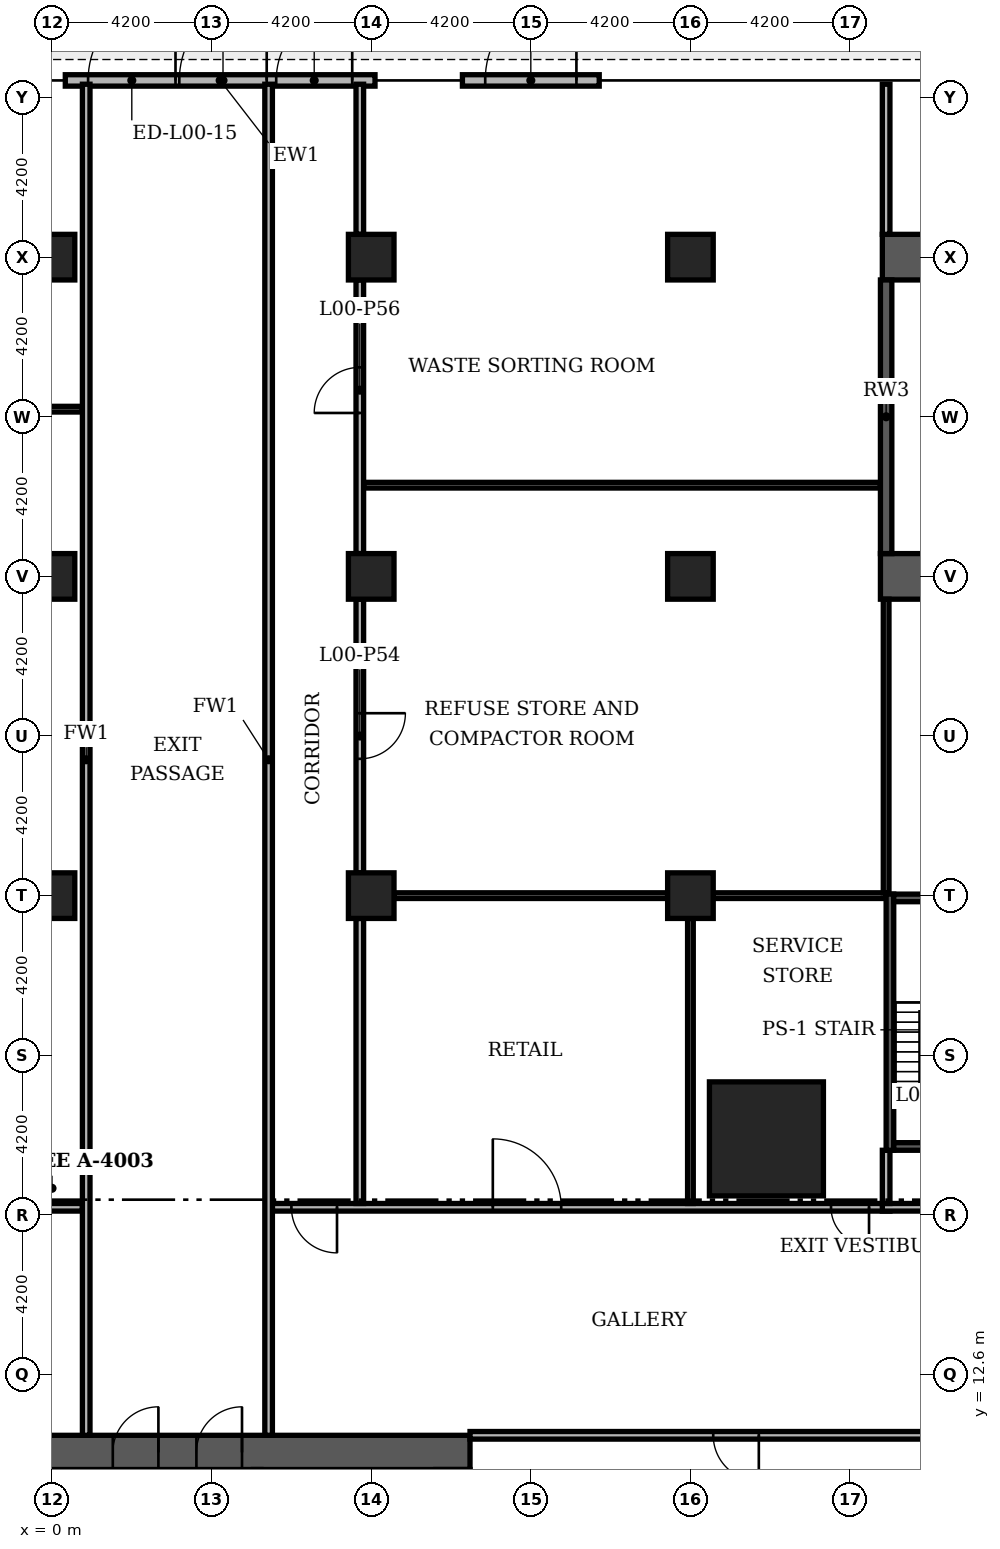
"""IFC4 building model, lengths in metres.
Left out: names, types, materials, properties, quantities, classifications, styles, units other than length and angle.
Written with IfcOpenShell. Run it as: python <this file> out.ifc"""

import sys

from ifc_helpers import new_model, si_unit, direction, frame, frame_2d, origin, origin_2d, place, context, subcontext, project, spatial, rectangle, extrude, element, fill, save


model = new_model("IFC4")
c1 = context("Model", 3, precision=1e-05, world=origin(), true_north=direction((0.0, 1.0)))
c2 = subcontext(c1, "Body", "Model", "MODEL_VIEW")
j1 = project(units=[si_unit("LENGTHUNIT", "METRE"), si_unit("PLANEANGLEUNIT", "RADIAN")], contexts=[c1])
p1 = place(None, origin())
s1 = spatial("IfcSite", under=j1, at=p1, CompositionType="ELEMENT")
p2 = place(p1, origin())
s2 = spatial("IfcBuilding", under=s1, at=p2, CompositionType="ELEMENT")
p3 = place(p2, origin())
s3 = spatial("IfcBuildingStorey", under=s2, at=p3, CompositionType="ELEMENT", Elevation=0.0)
p4 = place(p3, frame((-11.0, 10.55, 0.0), z_axis=(0.0, 0.0, 1.0), x_axis=(1.0, 0.0, 0.0)))
e1 = element("IfcWall", 1, at=p4, inside=s3, PredefinedType="SHEAR", context=c2, shape_type="SweptSolid", body=[
    extrude(rectangle(XDim=22.0, YDim=0.9, at=frame_2d((11.0, 0.0))), origin(), (0.0, 0.0, 1.0), 6.78),
])
p5 = place(p4, frame((12.6, 0.0, 0.0)))
e2 = element("IfcOpeningElement", 2, at=p5, cuts=e1, PredefinedType="OPENING", context=c2, shape_type="SweptSolid", body=[
    extrude(rectangle(XDim=1.2, YDim=2.2, at=frame_2d((0.6, 1.1))), frame((0.0, 0.46, 0.0), z_axis=(0.0, -1.0, 0.0), x_axis=(1.0, 0.0, 0.0)), (0.0, 0.0, 1.0), 0.92),
])
p6 = place(p4, frame((14.8, 0.0, 0.0)))
e3 = element("IfcOpeningElement", 3, at=p6, cuts=e1, PredefinedType="OPENING", context=c2, shape_type="SweptSolid", body=[
    extrude(rectangle(XDim=1.2, YDim=2.2, at=frame_2d((0.6, 1.1))), frame((0.0, 0.46, 0.0), z_axis=(0.0, -1.0, 0.0), x_axis=(1.0, 0.0, 0.0)), (0.0, 0.0, 1.0), 0.92),
])
p7 = place(p3, frame((18.8, 18.8, 0.0), z_axis=(0.0, 0.0, 1.0), x_axis=(1.0, 0.0, 0.0)))
e4 = element("IfcColumn", 4, at=p7, inside=s3, PredefinedType="COLUMN", context=c2, shape_type="SweptSolid", body=[
    extrude(rectangle(XDim=3.0, YDim=3.0, at=origin_2d()), origin(), (0.0, 0.0, 1.0), 7.2),
])
for number, where, z_axis, x_axis in (
    (5, (0.0, 25.2, 0.0), (0.0, 0.0, 1.0), (1.0, 0.0, 0.0)),
    (6, (8.4, 25.2, 0.0), (0.0, 0.0, 1.0), (1.0, 0.0, 0.0)),
    (7, (16.8, 25.2, 0.0), (0.0, 0.0, 1.0), (1.0, 0.0, 0.0)),
    (8, (0.0, 33.6, 0.0), (0.0, 0.0, 1.0), (1.0, 0.0, 0.0)),
    (9, (0.0, 42.0, 0.0), (0.0, 0.0, 1.0), (1.0, 0.0, 0.0)),
    (10, (8.4, 33.6, 0.0), (0.0, 0.0, 1.0), (1.0, 0.0, 0.0)),
    (11, (8.4, 42.0, 0.0), (0.0, 0.0, 1.0), (1.0, 0.0, 0.0)),
    (12, (16.8, 33.6, 0.0), (0.0, 0.0, 1.0), (1.0, 0.0, 0.0)),
    (13, (16.8, 42.0, 0.0), (0.0, 0.0, 1.0), (1.0, 0.0, 0.0)),
):
    element("IfcColumn", number, at=place(p3, frame(where, z_axis=z_axis, x_axis=x_axis)), inside=s3, PredefinedType="COLUMN", context=c2, shape_type="SweptSolid", body=[
        extrude(rectangle(XDim=1.2, YDim=1.2, at=origin_2d()), origin(), (0.0, 0.0, 1.0), 7.2),
    ])
p8 = place(p3, frame((14.4, 46.65, 0.0), z_axis=(0.0, 0.0, 1.0), x_axis=(-1.0, 0.0, 0.0)))
e14 = element("IfcWall", 14, at=p8, inside=s3, PredefinedType="STANDARD", context=c2, shape_type="SweptSolid", body=[
    extrude(rectangle(XDim=3.6, YDim=0.3, at=frame_2d((1.8, 0.0))), origin(), (0.0, 0.0, 1.0), 6.78),
])
p9 = place(p8, frame((0.6, 0.0, 0.0)))
e15 = element("IfcOpeningElement", 15, at=p9, cuts=e14, PredefinedType="OPENING", context=c2, shape_type="SweptSolid", body=[
    extrude(rectangle(XDim=2.4, YDim=2.4, at=frame_2d((1.2, 1.2))), frame((0.0, 0.16, 0.0), z_axis=(0.0, -1.0, 0.0), x_axis=(1.0, 0.0, 0.0)), (0.0, 0.0, 1.0), 0.32),
])
p10 = place(p3, frame((8.5, 46.65, 0.0), z_axis=(0.0, 0.0, 1.0), x_axis=(-1.0, 0.0, 0.0)))
e16 = element("IfcWall", 16, at=p10, inside=s3, PredefinedType="STANDARD", context=c2, shape_type="SweptSolid", body=[
    extrude(rectangle(XDim=8.15, YDim=0.3, at=frame_2d((4.075, 0.0))), origin(), (0.0, 0.0, 1.0), 6.78),
])
p11 = place(p10, frame((0.6, 0.0, 0.0)))
e17 = element("IfcOpeningElement", 17, at=p11, cuts=e16, PredefinedType="OPENING", context=c2, shape_type="SweptSolid", body=[
    extrude(rectangle(XDim=2.0, YDim=2.4, at=frame_2d((1.0, 1.2))), frame((0.0, 0.16, 0.0), z_axis=(0.0, -1.0, 0.0), x_axis=(1.0, 0.0, 0.0)), (0.0, 0.0, 1.0), 0.32),
])
p12 = place(p10, frame((2.85, 0.0, 0.0)))
e18 = element("IfcOpeningElement", 18, at=p12, cuts=e16, PredefinedType="OPENING", context=c2, shape_type="SweptSolid", body=[
    extrude(rectangle(XDim=2.3, YDim=2.4, at=frame_2d((1.15, 1.2))), frame((0.0, 0.16, 0.0), z_axis=(0.0, -1.0, 0.0), x_axis=(1.0, 0.0, 0.0)), (0.0, 0.0, 1.0), 0.32),
])
p13 = place(p10, frame((5.25, 0.0, 0.0)))
e19 = element("IfcOpeningElement", 19, at=p13, cuts=e16, PredefinedType="OPENING", context=c2, shape_type="SweptSolid", body=[
    extrude(rectangle(XDim=2.3, YDim=2.4, at=frame_2d((1.15, 1.2))), frame((0.0, 0.16, 0.0), z_axis=(0.0, -1.0, 0.0), x_axis=(1.0, 0.0, 0.0)), (0.0, 0.0, 1.0), 0.32),
])
p14 = place(p3, frame((11.0, 11.0, 0.0), z_axis=(0.0, 0.0, 1.0), x_axis=(1.0, 0.0, 0.0)))
e20 = element("IfcWall", 20, at=p14, inside=s3, PredefinedType="PARTITIONING", context=c2, shape_type="SweptSolid", body=[
    extrude(rectangle(XDim=14.1, YDim=0.2, at=frame_2d((7.05, 0.0))), origin(), (0.0, 0.0, 1.0), 6.78),
])
p15 = place(p14, frame((6.4, 0.0, 0.0)))
e21 = element("IfcOpeningElement", 21, at=p15, cuts=e20, PredefinedType="OPENING", context=c2, shape_type="SweptSolid", body=[
    extrude(rectangle(XDim=1.2, YDim=2.2, at=frame_2d((0.6, 1.1))), frame((0.0, 0.11, 0.0), z_axis=(0.0, -1.0, 0.0), x_axis=(1.0, 0.0, 0.0)), (0.0, 0.0, 1.0), 0.22),
])
p16 = place(p3, frame((-22.05, 17.0, 0.0), z_axis=(0.0, 0.0, 1.0), x_axis=(1.0, 0.0, 0.0)))
e22 = element("IfcWall", 22, at=p16, inside=s3, PredefinedType="PARTITIONING", context=c2, shape_type="SweptSolid", body=[
    extrude(rectangle(XDim=22.85, YDim=0.2, at=frame_2d((11.425, 0.0))), origin(), (0.0, 0.0, 1.0), 6.78),
])
p17 = place(p16, frame((0.55, 0.0, 0.0)))
e23 = element("IfcOpeningElement", 23, at=p17, cuts=e22, PredefinedType="OPENING", context=c2, shape_type="SweptSolid", body=[
    extrude(rectangle(XDim=1.0, YDim=2.1, at=frame_2d((0.5, 1.05))), frame((0.0, 0.11, 0.0), z_axis=(0.0, -1.0, 0.0), x_axis=(1.0, 0.0, 0.0)), (0.0, 0.0, 1.0), 0.22),
])
p18 = place(p16, frame((13.15, 0.0, 0.0)))
e24 = element("IfcOpeningElement", 24, at=p18, cuts=e22, PredefinedType="OPENING", context=c2, shape_type="SweptSolid", body=[
    extrude(rectangle(XDim=1.8, YDim=2.2, at=frame_2d((0.9, 1.1))), frame((0.0, 0.11, 0.0), z_axis=(0.0, -1.0, 0.0), x_axis=(1.0, 0.0, 0.0)), (0.0, 0.0, 1.0), 0.22),
])
p19 = place(p3, frame((5.8, 17.0, 0.0), z_axis=(0.0, 0.0, 1.0), x_axis=(1.0, 0.0, 0.0)))
e25 = element("IfcWall", 25, at=p19, inside=s3, PredefinedType="PARTITIONING", context=c2, shape_type="SweptSolid", body=[
    extrude(rectangle(XDim=16.25, YDim=0.2, at=frame_2d((8.125, 0.0))), origin(), (0.0, 0.0, 1.0), 6.78),
])
p20 = place(p19, frame((0.5, 0.0, 0.0)))
e26 = element("IfcOpeningElement", 26, at=p20, cuts=e25, PredefinedType="OPENING", context=c2, shape_type="SweptSolid", body=[
    extrude(rectangle(XDim=1.2, YDim=2.2, at=frame_2d((0.6, 1.1))), frame((0.0, 0.11, 0.0), z_axis=(0.0, -1.0, 0.0), x_axis=(1.0, 0.0, 0.0)), (0.0, 0.0, 1.0), 0.22),
])
p21 = place(p19, frame((5.8, 0.0, 0.0)))
e27 = element("IfcOpeningElement", 27, at=p21, cuts=e25, PredefinedType="OPENING", context=c2, shape_type="SweptSolid", body=[
    extrude(rectangle(XDim=1.8, YDim=2.2, at=frame_2d((0.9, 1.1))), frame((0.0, 0.11, 0.0), z_axis=(0.0, -1.0, 0.0), x_axis=(1.0, 0.0, 0.0)), (0.0, 0.0, 1.0), 0.22),
])
p22 = place(p19, frame((14.7, 0.0, 0.0)))
e28 = element("IfcOpeningElement", 28, at=p22, cuts=e25, PredefinedType="OPENING", context=c2, shape_type="SweptSolid", body=[
    extrude(rectangle(XDim=1.0, YDim=2.1, at=frame_2d((0.5, 1.05))), frame((0.0, 0.11, 0.0), z_axis=(0.0, -1.0, 0.0), x_axis=(1.0, 0.0, 0.0)), (0.0, 0.0, 1.0), 0.22),
])
p23 = place(p3, frame((21.85, 17.0, 0.0), z_axis=(0.0, 0.0, 1.0), x_axis=(1.0, 0.0, 0.0)))
e29 = element("IfcWall", 29, at=p23, inside=s3, PredefinedType="PARTITIONING", context=c2, shape_type="SweptSolid", body=[
    extrude(rectangle(XDim=2.75, YDim=0.2, at=frame_2d((1.375, 0.0))), origin(), (0.0, 0.0, 1.0), 6.78),
])
p24 = place(p3, frame((9.0, 25.2, 0.0), z_axis=(0.0, 0.0, 1.0), x_axis=(1.0, 0.0, 0.0)))
e30 = element("IfcWall", 30, at=p24, inside=s3, PredefinedType="PARTITIONING", context=c2, shape_type="SweptSolid", body=[
    extrude(rectangle(XDim=7.2, YDim=0.15, at=frame_2d((3.6, 0.0))), origin(), (0.0, 0.0, 1.0), 6.48),
])
p25 = place(p3, frame((17.4, 25.2, 0.0), z_axis=(0.0, 0.0, 1.0), x_axis=(1.0, 0.0, 0.0)))
e31 = element("IfcWall", 31, at=p25, inside=s3, PredefinedType="PARTITIONING", context=c2, shape_type="SweptSolid", body=[
    extrude(rectangle(XDim=4.55, YDim=0.15, at=frame_2d((2.275, 0.0))), origin(), (0.0, 0.0, 1.0), 6.48),
])
p26 = place(p3, frame((21.8, 33.6, 0.0), z_axis=(0.0, 0.0, 1.0), x_axis=(1.0, 0.0, 0.0)))
e32 = element("IfcWall", 32, at=p26, inside=s3, PredefinedType="SOLIDWALL", context=c2, shape_type="SweptSolid", body=[
    extrude(rectangle(XDim=2.8, YDim=1.2, at=frame_2d((1.4, 0.0))), origin(), (0.0, 0.0, 1.0), 6.78),
])
p27 = place(p3, frame((8.2, 36.0, 0.0), z_axis=(0.0, 0.0, 1.0), x_axis=(1.0, 0.0, 0.0)))
e33 = element("IfcWall", 33, at=p27, inside=s3, PredefinedType="PARTITIONING", context=c2, shape_type="SweptSolid", body=[
    extrude(rectangle(XDim=13.6, YDim=0.15, at=frame_2d((6.8, 0.0))), origin(), (0.0, 0.0, 1.0), 6.38),
])
p28 = place(p3, frame((-46.55, 38.0, 0.0), z_axis=(0.0, 0.0, 1.0), x_axis=(1.0, 0.0, 0.0)))
e34 = element("IfcWall", 34, at=p28, inside=s3, PredefinedType="PARTITIONING", context=c2, shape_type="SweptSolid", body=[
    extrude(rectangle(XDim=47.35, YDim=0.15, at=frame_2d((23.675, 0.0))), origin(), (0.0, 0.0, 1.0), 6.38),
])
p29 = place(p3, frame((21.85, 42.0, 0.0), z_axis=(0.0, 0.0, 1.0), x_axis=(1.0, 0.0, 0.0)))
e35 = element("IfcWall", 35, at=p29, inside=s3, PredefinedType="SOLIDWALL", context=c2, shape_type="SweptSolid", body=[
    extrude(rectangle(XDim=2.75, YDim=1.2, at=frame_2d((1.375, 0.0))), origin(), (0.0, 0.0, 1.0), 6.78),
])
for number, where, z_axis, x_axis in (
    (36, (0.9, 11.0, 0.0), (0.0, 0.0, 1.0), (0.0, 1.0, 0.0)),
    (37, (5.7, 11.0, 0.0), (0.0, 0.0, 1.0), (0.0, 1.0, 0.0)),
):
    element("IfcWall", number, at=place(p3, frame(where, z_axis=z_axis, x_axis=x_axis)), inside=s3, PredefinedType="PARTITIONING", context=c2, shape_type="SweptSolid", body=[
        extrude(rectangle(XDim=35.55, YDim=0.2, at=frame_2d((17.775, 0.0))), origin(), (0.0, 0.0, 1.0), 6.48),
    ])
p30 = place(p3, frame((8.1, 17.1, 0.0), z_axis=(0.0, 0.0, 1.0), x_axis=(0.0, 1.0, 0.0)))
e38 = element("IfcWall", 38, at=p30, inside=s3, PredefinedType="PARTITIONING", context=c2, shape_type="SweptSolid", body=[
    extrude(rectangle(XDim=7.5, YDim=0.2, at=frame_2d((3.75, 0.0))), origin(), (0.0, 0.0, 1.0), 6.78),
])
p31 = place(p3, frame((8.1, 25.8, 0.0), z_axis=(0.0, 0.0, 1.0), x_axis=(0.0, 1.0, 0.0)))
e39 = element("IfcWall", 39, at=p31, inside=s3, PredefinedType="PARTITIONING", context=c2, shape_type="SweptSolid", body=[
    extrude(rectangle(XDim=7.2, YDim=0.2, at=frame_2d((3.6, 0.0))), origin(), (0.0, 0.0, 1.0), 6.78),
])
p32 = place(p31, frame((3.0, 0.0, 0.0)))
e40 = element("IfcOpeningElement", 40, at=p32, cuts=e39, PredefinedType="OPENING", context=c2, shape_type="SweptSolid", body=[
    extrude(rectangle(XDim=1.2, YDim=2.2, at=frame_2d((0.6, 1.1))), frame((0.0, 0.11, 0.0), z_axis=(0.0, -1.0, 0.0), x_axis=(1.0, 0.0, 0.0)), (0.0, 0.0, 1.0), 0.22),
])
p33 = place(p3, frame((8.1, 34.2, 0.0), z_axis=(0.0, 0.0, 1.0), x_axis=(0.0, 1.0, 0.0)))
e41 = element("IfcWall", 41, at=p33, inside=s3, PredefinedType="PARTITIONING", context=c2, shape_type="SweptSolid", body=[
    extrude(rectangle(XDim=7.2, YDim=0.2, at=frame_2d((3.6, 0.0))), origin(), (0.0, 0.0, 1.0), 6.78),
])
p34 = place(p33, frame((3.7, 0.0, 0.0)))
e42 = element("IfcOpeningElement", 42, at=p34, cuts=e41, PredefinedType="OPENING", context=c2, shape_type="SweptSolid", body=[
    extrude(rectangle(XDim=1.2, YDim=2.2, at=frame_2d((0.6, 1.1))), frame((0.0, 0.11, 0.0), z_axis=(0.0, -1.0, 0.0), x_axis=(1.0, 0.0, 0.0)), (0.0, 0.0, 1.0), 0.22),
])
p35 = place(p3, frame((8.1, 42.6, 0.0), z_axis=(0.0, 0.0, 1.0), x_axis=(0.0, 1.0, 0.0)))
e43 = element("IfcWall", 43, at=p35, inside=s3, PredefinedType="PARTITIONING", context=c2, shape_type="SweptSolid", body=[
    extrude(rectangle(XDim=3.95, YDim=0.2, at=frame_2d((1.975, 0.0))), origin(), (0.0, 0.0, 1.0), 6.78),
])
p36 = place(p3, frame((16.8, 17.1, 0.0), z_axis=(0.0, 0.0, 1.0), x_axis=(0.0, 1.0, 0.0)))
e44 = element("IfcWall", 44, at=p36, inside=s3, PredefinedType="PARTITIONING", context=c2, shape_type="SweptSolid", body=[
    extrude(rectangle(XDim=7.5, YDim=0.15, at=frame_2d((3.75, 0.0))), origin(), (0.0, 0.0, 1.0), 6.78),
])
p37 = place(p3, frame((21.95, 17.1, 0.0), z_axis=(0.0, 0.0, 1.0), x_axis=(0.0, 1.0, 0.0)))
e45 = element("IfcWall", 45, at=p37, inside=s3, PredefinedType="PARTITIONING", context=c2, shape_type="SweptSolid", body=[
    extrude(rectangle(XDim=1.4, YDim=0.2, at=frame_2d((0.7, 0.0))), origin(), (0.0, 0.0, 1.0), 6.78),
])
p38 = place(p3, frame((21.95, 25.275, 0.0), z_axis=(0.0, 0.0, 1.0), x_axis=(0.0, 1.0, 0.0)))
e46 = element("IfcWall", 46, at=p38, inside=s3, PredefinedType="PARTITIONING", context=c2, shape_type="SweptSolid", body=[
    extrude(rectangle(XDim=7.725, YDim=0.15, at=frame_2d((3.863, 0.0))), origin(), (0.0, 0.0, 1.0), 6.78),
])
p39 = place(p3, frame((21.95, 34.2, 0.0), z_axis=(0.0, 0.0, 1.0), x_axis=(0.0, 1.0, 0.0)))
e47 = element("IfcWall", 47, at=p39, inside=s3, PredefinedType="SOLIDWALL", context=c2, shape_type="SweptSolid", body=[
    extrude(rectangle(XDim=7.2, YDim=0.3, at=frame_2d((3.6, 0.0))), origin(), (0.0, 0.0, 1.0), 6.78),
])
p40 = place(p3, frame((21.95, 42.6, 0.0), z_axis=(0.0, 0.0, 1.0), x_axis=(0.0, 1.0, 0.0)))
e48 = element("IfcWall", 48, at=p40, inside=s3, PredefinedType="PARTITIONING", context=c2, shape_type="SweptSolid", body=[
    extrude(rectangle(XDim=3.95, YDim=0.2, at=frame_2d((1.975, 0.0))), origin(), (0.0, 0.0, 1.0), 6.78),
])
p41 = place(p3, frame((22.05, 18.5, 0.0), z_axis=(0.0, 0.0, 1.0), x_axis=(0.0, 1.0, 0.0)))
e49 = element("IfcWall", 49, at=p41, inside=s3, PredefinedType="SOLIDWALL", context=c2, shape_type="SweptSolid", body=[
    extrude(rectangle(XDim=6.74, YDim=0.2, at=frame_2d((3.37, 0.0))), origin(), (0.0, 0.0, 1.0), 6.78),
])
p42 = place(p3, frame((22.15, 18.6, 0.0), z_axis=(0.0, 0.0, 1.0), x_axis=(1.0, 0.0, 0.0)))
e50 = element("IfcWall", 50, at=p42, inside=s3, PredefinedType="SOLIDWALL", context=c2, shape_type="SweptSolid", body=[
    extrude(rectangle(XDim=2.85, YDim=0.2, at=frame_2d((1.425, 0.0))), origin(), (0.0, 0.0, 1.0), 6.78),
])
p43 = place(p42, frame((0.875, 0.0, 0.0)))
e51 = element("IfcOpeningElement", 51, at=p43, cuts=e50, PredefinedType="OPENING", context=c2, shape_type="SweptSolid", body=[
    extrude(rectangle(XDim=1.1, YDim=2.2, at=frame_2d((0.55, 1.1))), frame((0.0, 0.11, 0.0), z_axis=(0.0, -1.0, 0.0), x_axis=(1.0, 0.0, 0.0)), (0.0, 0.0, 1.0), 0.22),
])
p44 = place(p3, frame((22.15, 25.14, 0.0), z_axis=(0.0, 0.0, 1.0), x_axis=(1.0, 0.0, 0.0)))
e52 = element("IfcWall", 52, at=p44, inside=s3, PredefinedType="SOLIDWALL", context=c2, shape_type="SweptSolid", body=[
    extrude(rectangle(XDim=2.85, YDim=0.2, at=frame_2d((1.425, 0.0))), origin(), (0.0, 0.0, 1.0), 6.48),
])
p45 = place(p9, frame((2.4, 0.0, 0.0), z_axis=(0.0, 0.0, 1.0), x_axis=(-1.0, 0.0, 0.0)))
e53 = element("IfcDoor", 53, at=p45, inside=s3, OperationType="DOUBLE_DOOR_SINGLE_SWING", PredefinedType="DOOR", context=c2, shape_type="SweptSolid", body=[
    extrude(rectangle(XDim=2.4, YDim=2.4, at=frame_2d((1.2, 1.2))), frame((0.0, 0.025, 0.0), z_axis=(0.0, -1.0, 0.0), x_axis=(1.0, 0.0, 0.0)), (0.0, 0.0, 1.0), 0.05),
])
fill(e15, e53)
p46 = place(p11, frame((2.0, 0.0, 0.0), z_axis=(0.0, 0.0, 1.0), x_axis=(-1.0, 0.0, 0.0)))
e54 = element("IfcDoor", 54, at=p46, inside=s3, OperationType="DOUBLE_DOOR_SINGLE_SWING", PredefinedType="DOOR", context=c2, shape_type="SweptSolid", body=[
    extrude(rectangle(XDim=2.0, YDim=2.4, at=frame_2d((1.0, 1.2))), frame((0.0, 0.025, 0.0), z_axis=(0.0, -1.0, 0.0), x_axis=(1.0, 0.0, 0.0)), (0.0, 0.0, 1.0), 0.05),
])
fill(e17, e54)
p47 = place(p12, frame((2.3, 0.0, 0.0), z_axis=(0.0, 0.0, 1.0), x_axis=(-1.0, 0.0, 0.0)))
e55 = element("IfcDoor", 55, at=p47, inside=s3, OperationType="SINGLE_SWING_LEFT", PredefinedType="DOOR", context=c2, shape_type="SweptSolid", body=[
    extrude(rectangle(XDim=2.3, YDim=2.4, at=frame_2d((1.15, 1.2))), frame((0.0, 0.025, 0.0), z_axis=(0.0, -1.0, 0.0), x_axis=(1.0, 0.0, 0.0)), (0.0, 0.0, 1.0), 0.05),
])
fill(e18, e55)
p48 = place(p13, frame((2.3, 0.0, 0.0), z_axis=(0.0, 0.0, 1.0), x_axis=(-1.0, 0.0, 0.0)))
e56 = element("IfcDoor", 56, at=p48, inside=s3, OperationType="SINGLE_SWING_LEFT", PredefinedType="DOOR", context=c2, shape_type="SweptSolid", body=[
    extrude(rectangle(XDim=2.3, YDim=2.4, at=frame_2d((1.15, 1.2))), frame((0.0, 0.025, 0.0), z_axis=(0.0, -1.0, 0.0), x_axis=(1.0, 0.0, 0.0)), (0.0, 0.0, 1.0), 0.05),
])
fill(e19, e56)
p49 = place(p5, origin())
e57 = element("IfcDoor", 57, at=p49, inside=s3, OperationType="SINGLE_SWING_RIGHT", PredefinedType="DOOR", context=c2, shape_type="SweptSolid", body=[
    extrude(rectangle(XDim=1.2, YDim=2.2, at=frame_2d((0.6, 1.1))), frame((0.0, 0.025, 0.0), z_axis=(0.0, -1.0, 0.0), x_axis=(1.0, 0.0, 0.0)), (0.0, 0.0, 1.0), 0.05),
])
fill(e2, e57)
p50 = place(p6, origin())
e58 = element("IfcDoor", 58, at=p50, inside=s3, OperationType="SINGLE_SWING_RIGHT", PredefinedType="DOOR", context=c2, shape_type="SweptSolid", body=[
    extrude(rectangle(XDim=1.2, YDim=2.2, at=frame_2d((0.6, 1.1))), frame((0.0, 0.025, 0.0), z_axis=(0.0, -1.0, 0.0), x_axis=(1.0, 0.0, 0.0)), (0.0, 0.0, 1.0), 0.05),
])
fill(e3, e58)
p51 = place(p15, origin())
e59 = element("IfcDoor", 59, at=p51, inside=s3, OperationType="SINGLE_SWING_RIGHT", PredefinedType="DOOR", context=c2, shape_type="SweptSolid", body=[
    extrude(rectangle(XDim=1.2, YDim=2.2, at=frame_2d((0.6, 1.1))), frame((0.0, 0.025, 0.0), z_axis=(0.0, -1.0, 0.0), x_axis=(1.0, 0.0, 0.0)), (0.0, 0.0, 1.0), 0.05),
])
fill(e21, e59)
p52 = place(p20, origin())
e60 = element("IfcDoor", 60, at=p52, inside=s3, OperationType="SINGLE_SWING_RIGHT", PredefinedType="DOOR", context=c2, shape_type="SweptSolid", body=[
    extrude(rectangle(XDim=1.2, YDim=2.2, at=frame_2d((0.6, 1.1))), frame((0.0, 0.025, 0.0), z_axis=(0.0, -1.0, 0.0), x_axis=(1.0, 0.0, 0.0)), (0.0, 0.0, 1.0), 0.05),
])
fill(e26, e60)
p53 = place(p21, origin())
e61 = element("IfcDoor", 61, at=p53, inside=s3, OperationType="DOUBLE_DOOR_SINGLE_SWING", PredefinedType="DOOR", context=c2, shape_type="SweptSolid", body=[
    extrude(rectangle(XDim=1.8, YDim=2.2, at=frame_2d((0.9, 1.1))), frame((0.0, 0.025, 0.0), z_axis=(0.0, -1.0, 0.0), x_axis=(1.0, 0.0, 0.0)), (0.0, 0.0, 1.0), 0.05),
])
fill(e27, e61)
p54 = place(p22, origin())
e62 = element("IfcDoor", 62, at=p54, inside=s3, OperationType="SINGLE_SWING_RIGHT", PredefinedType="DOOR", context=c2, shape_type="SweptSolid", body=[
    extrude(rectangle(XDim=1.0, YDim=2.1, at=frame_2d((0.5, 1.05))), frame((0.0, 0.025, 0.0), z_axis=(0.0, -1.0, 0.0), x_axis=(1.0, 0.0, 0.0)), (0.0, 0.0, 1.0), 0.05),
])
fill(e28, e62)
p55 = place(p32, origin())
e63 = element("IfcDoor", 63, at=p55, inside=s3, OperationType="SINGLE_SWING_RIGHT", PredefinedType="DOOR", context=c2, shape_type="SweptSolid", body=[
    extrude(rectangle(XDim=1.2, YDim=2.2, at=frame_2d((0.6, 1.1))), frame((0.0, 0.025, 0.0), z_axis=(0.0, -1.0, 0.0), x_axis=(1.0, 0.0, 0.0)), (0.0, 0.0, 1.0), 0.05),
])
fill(e40, e63)
p56 = place(p34, origin())
e64 = element("IfcDoor", 64, at=p56, inside=s3, OperationType="SINGLE_SWING_LEFT", PredefinedType="DOOR", context=c2, shape_type="SweptSolid", body=[
    extrude(rectangle(XDim=1.2, YDim=2.2, at=frame_2d((0.6, 1.1))), frame((0.0, 0.025, 0.0), z_axis=(0.0, -1.0, 0.0), x_axis=(1.0, 0.0, 0.0)), (0.0, 0.0, 1.0), 0.05),
])
fill(e42, e64)
save(model, sys.argv[1])
